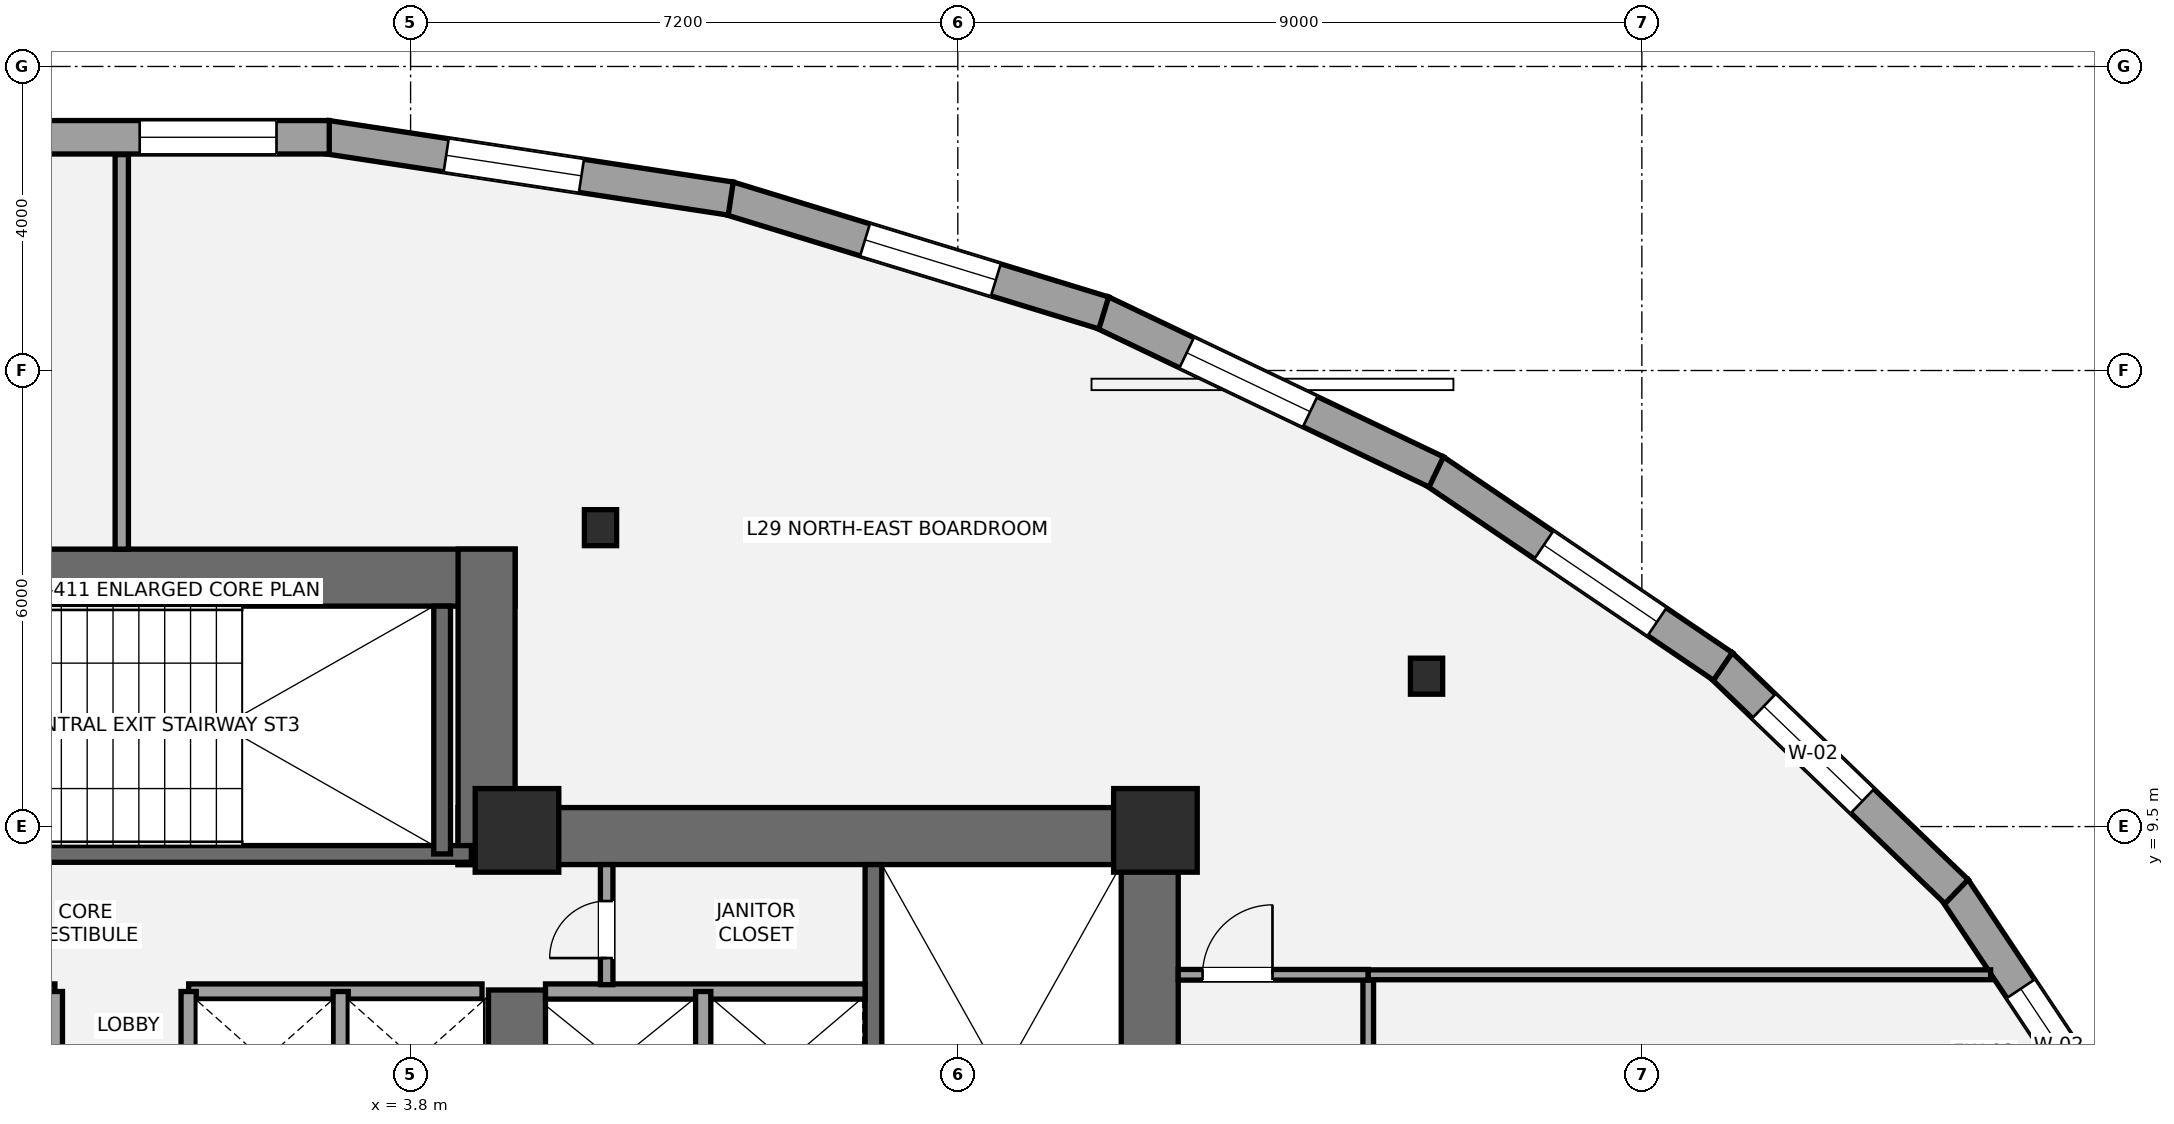
"""IFC4 building model, lengths in metres.
Left out: names, types, materials, properties, quantities, classifications, styles, units other than length and angle.
Written with IfcOpenShell. Run it as: python <this file> out.ifc"""

import sys

from ifc_helpers import new_model, si_unit, direction, frame, frame_2d, origin, origin_2d, place, context, subcontext, project, spatial, rectangle, i_section, extrude, element, fill, save


model = new_model("IFC4")
c1 = context("Model", 3, precision=1e-05, world=origin(), true_north=direction((0.0, 1.0)))
c2 = subcontext(c1, "Body", "Model", "MODEL_VIEW")
j1 = project(units=[si_unit("LENGTHUNIT", "METRE"), si_unit("PLANEANGLEUNIT", "RADIAN")], contexts=[c1])
p1 = place(None, origin())
s1 = spatial("IfcSite", under=j1, at=p1, CompositionType="ELEMENT")
p2 = place(p1, origin())
s2 = spatial("IfcBuilding", under=s1, at=p2, CompositionType="ELEMENT")
p3 = place(p2, frame((0.0, 0.0, 110.6)))
s3 = spatial("IfcBuildingStorey", under=s2, at=p3, CompositionType="ELEMENT", Elevation=110.6)
p4 = place(p3, frame((13.525, 1.1, 0.0), z_axis=(0.0, 0.0, 1.0), x_axis=(0.0, 1.0, 0.0)))
e1 = element("IfcWall", 1, at=p4, inside=s3, PredefinedType="SHEAR", context=c2, shape_type="SweptSolid", body=[
    extrude(rectangle(XDim=8.65, YDim=0.75, at=frame_2d((4.325, 0.0))), origin(), (0.0, 0.0, 1.0), 3.5),
])
p5 = place(p3, frame((4.425, 9.375, 0.0), z_axis=(0.0, 0.0, 1.0), x_axis=(1.0, 0.0, 0.0)))
e2 = element("IfcWall", 2, at=p5, inside=s3, PredefinedType="SHEAR", context=c2, shape_type="SweptSolid", body=[
    extrude(rectangle(XDim=9.475, YDim=0.75, at=frame_2d((4.737, 0.0))), origin(), (0.0, 0.0, 1.0), 3.5),
])
p6 = place(p3, frame((5.2, 5.35, 0.0), z_axis=(0.0, 0.0, 1.0), x_axis=(0.0, 1.0, 0.0)))
e3 = element("IfcWall", 3, at=p6, inside=s3, PredefinedType="SHEAR", context=c2, shape_type="SweptSolid", body=[
    extrude(rectangle(XDim=2.0, YDim=0.75, at=frame_2d((1.0, 0.0))), origin(), (0.0, 0.0, 1.0), 3.5),
])
p7 = place(p3, frame((9.89, 1.85, 0.0), z_axis=(0.0, 0.0, 1.0), x_axis=(0.0, 1.0, 0.0)))
e4 = element("IfcWall", 4, at=p7, inside=s3, PredefinedType="SHEAR", context=c2, shape_type="SweptSolid", body=[
    extrude(rectangle(XDim=7.15, YDim=0.22, at=frame_2d((3.575, 0.0))), origin(), (0.0, 0.0, 1.0), 3.5),
])
p8 = place(p3, frame((-5.175, 12.775, 0.0), z_axis=(0.0, 0.0, 1.0), x_axis=(1.0, 0.0, 0.0)))
e5 = element("IfcWall", 5, at=p8, inside=s3, PredefinedType="SHEAR", context=c2, shape_type="SweptSolid", body=[
    extrude(rectangle(XDim=10.35, YDim=0.75, at=frame_2d((5.175, 0.0))), origin(), (0.0, 0.0, 1.0), 3.5),
])
p9 = place(p3, frame((4.8, 9.0, 0.0), z_axis=(0.0, 0.0, 1.0), x_axis=(0.0, 1.0, 0.0)))
e6 = element("IfcWall", 6, at=p9, inside=s3, PredefinedType="SHEAR", context=c2, shape_type="SweptSolid", body=[
    extrude(rectangle(XDim=4.15, YDim=0.75, at=frame_2d((2.075, 0.0))), origin(), (0.0, 0.0, 1.0), 3.5),
])
p10 = place(p3, frame((-4.7, 9.14, 0.0), z_axis=(0.0, 0.0, 1.0), x_axis=(1.0, 0.0, 0.0)))
e7 = element("IfcWall", 7, at=p10, inside=s3, PredefinedType="SHEAR", context=c2, shape_type="SweptSolid", body=[
    extrude(rectangle(XDim=9.3, YDim=0.22, at=frame_2d((4.65, 0.0))), origin(), (0.0, 0.0, 1.0), 3.5),
])
p11 = place(p10, frame((1.15, 0.0, 0.0)))
e8 = element("IfcOpeningElement", 8, at=p11, cuts=e7, PredefinedType="OPENING", context=c2, shape_type="SweptSolid", body=[
    extrude(rectangle(XDim=1.05, YDim=2.15, at=frame_2d((0.525, 1.075))), frame((0.0, 0.12, 0.0), z_axis=(0.0, -1.0, 0.0), x_axis=(1.0, 0.0, 0.0)), (0.0, 0.0, 1.0), 0.24),
])
p12 = place(p3, frame((4.215, 9.14, 0.0), z_axis=(0.0, 0.0, 1.0), x_axis=(0.0, 1.0, 0.0)))
e9 = element("IfcWall", 9, at=p12, inside=s3, PredefinedType="SHEAR", context=c2, shape_type="SweptSolid", body=[
    extrude(rectangle(XDim=3.26, YDim=0.22, at=frame_2d((1.63, 0.0))), origin(), (0.0, 0.0, 1.0), 3.5),
])
for number, where, z_axis, x_axis in (
    (10, (5.2, 9.45, 0.0), (0.0, 0.0, 1.0), (1.0, 0.0, 0.0)),
    (11, (13.6, 9.45, 0.0), (0.0, 0.0, 1.0), (1.0, 0.0, 0.0)),
):
    element("IfcColumn", number, at=place(p3, frame(where, z_axis=z_axis, x_axis=x_axis)), inside=s3, PredefinedType="COLUMN", context=c2, shape_type="SweptSolid", body=[
        extrude(rectangle(XDim=1.1, YDim=1.1, at=origin_2d()), origin(), (0.0, 0.0, 1.0), 3.5),
    ])
for number, where, z_axis, x_axis in (
    (12, (17.167, 11.478, 0.0), (0.0, 0.0, 1.0), (1.0, 0.0, 0.0)),
    (13, (6.299, 13.433, 0.0), (0.0, 0.0, 1.0), (1.0, 0.0, 0.0)),
):
    element("IfcColumn", number, at=place(p3, frame(where, z_axis=z_axis, x_axis=x_axis)), inside=s3, PredefinedType="COLUMN", context=c2, shape_type="SweptSolid", body=[
        extrude(i_section(OverallWidth=0.424, OverallDepth=0.474, WebThickness=0.048, FlangeThickness=0.077, at=origin_2d()), origin(), (0.0, 0.0, 1.0), 3.5),
    ])
p13 = place(p3, frame((24.11, 8.68, 0.0), z_axis=(0.0, 0.0, 1.0), x_axis=(0.554293965046, -0.83232097193, 0.0)))
e14 = element("IfcWall", 14, at=p13, inside=s3, PredefinedType="STANDARD", context=c2, shape_type="SweptSolid", body=[
    extrude(rectangle(XDim=4.023, YDim=0.44, at=frame_2d((2.011, 0.0))), origin(), (0.0, 0.0, 1.0), 2.528),
])
p14 = place(p13, frame((1.579, 0.0, 0.65)))
e15 = element("IfcOpeningElement", 15, at=p14, cuts=e14, PredefinedType="OPENING", context=c2, shape_type="SweptSolid", body=[
    extrude(rectangle(XDim=1.8, YDim=1.7, at=frame_2d((0.9, 0.85))), frame((0.0, 0.23, 0.0), z_axis=(0.0, -1.0, 0.0), x_axis=(1.0, 0.0, 0.0)), (0.0, 0.0, 1.0), 0.46),
])
p15 = place(p3, frame((21.037, 11.63, 0.0), z_axis=(0.0, 0.0, 1.0), x_axis=(0.720581378362, -0.693370375166, 0.0)))
e16 = element("IfcWall", 16, at=p15, inside=s3, PredefinedType="STANDARD", context=c2, shape_type="SweptSolid", body=[
    extrude(rectangle(XDim=4.307, YDim=0.44, at=frame_2d((2.153, 0.0))), origin(), (0.0, 0.0, 1.0), 2.528),
])
p16 = place(p15, frame((0.788, 0.0, 0.65)))
e17 = element("IfcOpeningElement", 17, at=p16, cuts=e16, PredefinedType="OPENING", context=c2, shape_type="SweptSolid", body=[
    extrude(rectangle(XDim=1.8, YDim=1.7, at=frame_2d((0.9, 0.85))), frame((0.0, 0.23, 0.0), z_axis=(0.0, -1.0, 0.0), x_axis=(1.0, 0.0, 0.0)), (0.0, 0.0, 1.0), 0.46),
])
p17 = place(p3, frame((17.266, 14.182, 0.0), z_axis=(0.0, 0.0, 1.0), x_axis=(0.827754551165, -0.56109036975, 0.0)))
e18 = element("IfcWall", 18, at=p17, inside=s3, PredefinedType="STANDARD", context=c2, shape_type="SweptSolid", body=[
    extrude(rectangle(XDim=4.591, YDim=0.44, at=frame_2d((2.295, 0.0))), origin(), (0.0, 0.0, 1.0), 2.528),
])
p18 = place(p17, frame((1.744, 0.0, 0.65)))
e19 = element("IfcOpeningElement", 19, at=p18, cuts=e18, PredefinedType="OPENING", context=c2, shape_type="SweptSolid", body=[
    extrude(rectangle(XDim=1.8, YDim=1.7, at=frame_2d((0.9, 0.85))), frame((0.0, 0.23, 0.0), z_axis=(0.0, -1.0, 0.0), x_axis=(1.0, 0.0, 0.0)), (0.0, 0.0, 1.0), 0.46),
])
p19 = place(p3, frame((12.89, 16.27, 0.0), z_axis=(0.0, 0.0, 1.0), x_axis=(0.902372757907, -0.430956385018, 0.0)))
e20 = element("IfcWall", 20, at=p19, inside=s3, PredefinedType="STANDARD", context=c2, shape_type="SweptSolid", body=[
    extrude(rectangle(XDim=4.882, YDim=0.44, at=frame_2d((2.441, 0.0))), origin(), (0.0, 0.0, 1.0), 2.528),
])
p20 = place(p19, frame((1.243, 0.0, 0.65)))
e21 = element("IfcOpeningElement", 21, at=p20, cuts=e20, PredefinedType="OPENING", context=c2, shape_type="SweptSolid", body=[
    extrude(rectangle(XDim=1.8, YDim=1.7, at=frame_2d((0.9, 0.85))), frame((0.0, 0.23, 0.0), z_axis=(0.0, -1.0, 0.0), x_axis=(1.0, 0.0, 0.0)), (0.0, 0.0, 1.0), 0.46),
])
p21 = place(p3, frame((7.981, 17.769, 0.0), z_axis=(0.0, 0.0, 1.0), x_axis=(0.956228569431, -0.292620783617, 0.0)))
e22 = element("IfcWall", 22, at=p21, inside=s3, PredefinedType="STANDARD", context=c2, shape_type="SweptSolid", body=[
    extrude(rectangle(XDim=5.165, YDim=0.44, at=frame_2d((2.583, 0.0))), origin(), (0.0, 0.0, 1.0), 2.528),
])
p22 = place(p21, frame((1.88, 0.0, 0.65)))
e23 = element("IfcOpeningElement", 23, at=p22, cuts=e22, PredefinedType="OPENING", context=c2, shape_type="SweptSolid", body=[
    extrude(rectangle(XDim=1.8, YDim=1.7, at=frame_2d((0.9, 0.85))), frame((0.0, 0.23, 0.0), z_axis=(0.0, -1.0, 0.0), x_axis=(1.0, 0.0, 0.0)), (0.0, 0.0, 1.0), 0.46),
])
p23 = place(p3, frame((2.697, 18.571, 0.0), z_axis=(0.0, 0.0, 1.0), x_axis=(0.988627497469, -0.150385076545, 0.0)))
e24 = element("IfcWall", 24, at=p23, inside=s3, PredefinedType="STANDARD", context=c2, shape_type="SweptSolid", body=[
    extrude(rectangle(XDim=5.377, YDim=0.44, at=frame_2d((2.688, 0.0))), origin(), (0.0, 0.0, 1.0), 2.528),
])
p24 = place(p23, frame((1.59, 0.0, 0.65)))
e25 = element("IfcOpeningElement", 25, at=p24, cuts=e24, PredefinedType="OPENING", context=c2, shape_type="SweptSolid", body=[
    extrude(rectangle(XDim=1.8, YDim=1.7, at=frame_2d((0.9, 0.85))), frame((0.0, 0.23, 0.0), z_axis=(0.0, -1.0, 0.0), x_axis=(1.0, 0.0, 0.0)), (0.0, 0.0, 1.0), 0.46),
])
p25 = place(p3, frame((-2.73, 18.568, 0.0), z_axis=(0.0, 0.0, 1.0), x_axis=(1.0, 0.0, 0.0)))
e26 = element("IfcWall", 26, at=p25, inside=s3, PredefinedType="STANDARD", context=c2, shape_type="SweptSolid", body=[
    extrude(rectangle(XDim=5.459, YDim=0.44, at=frame_2d((2.73, 0.0))), origin(), (0.0, 0.0, 1.0), 2.528),
])
p26 = place(p25, frame((2.966, 0.0, 0.65)))
e27 = element("IfcOpeningElement", 27, at=p26, cuts=e26, PredefinedType="OPENING", context=c2, shape_type="SweptSolid", body=[
    extrude(rectangle(XDim=1.8, YDim=1.7, at=frame_2d((0.9, 0.85))), frame((0.0, 0.23, 0.0), z_axis=(0.0, -1.0, 0.0), x_axis=(1.0, 0.0, 0.0)), (0.0, 0.0, 1.0), 0.46),
])
p27 = place(p3, frame((5.575, 7.33, 0.0), z_axis=(0.0, 0.0, 1.0), x_axis=(1.0, 0.0, 0.0)))
e28 = element("IfcWall", 28, at=p27, inside=s3, PredefinedType="SOLIDWALL", context=c2, shape_type="SweptSolid", body=[
    extrude(rectangle(XDim=4.205, YDim=0.2, at=frame_2d((2.103, 0.0))), origin(), (0.0, 0.0, 1.0), 3.31),
])
p28 = place(p3, frame((7.65, 5.47, 0.0), z_axis=(0.0, 0.0, 1.0), x_axis=(0.0, 1.0, 0.0)))
e29 = element("IfcWall", 29, at=p28, inside=s3, PredefinedType="SOLIDWALL", context=c2, shape_type="SweptSolid", body=[
    extrude(rectangle(XDim=1.86, YDim=0.2, at=frame_2d((0.93, 0.0))), origin(), (0.0, 0.0, 1.0), 3.31),
])
for number, where, z_axis, x_axis in (
    (30, (-4.74, 7.33, 0.0), (0.0, 0.0, 1.0), (1.0, 0.0, 0.0)),
    (31, (0.88, 7.33, 0.0), (0.0, 0.0, 1.0), (1.0, 0.0, 0.0)),
):
    element("IfcWall", number, at=place(p3, frame(where, z_axis=z_axis, x_axis=x_axis)), inside=s3, PredefinedType="SOLIDWALL", context=c2, shape_type="SweptSolid", body=[
        extrude(rectangle(XDim=3.86, YDim=0.2, at=frame_2d((1.93, 0.0))), origin(), (0.0, 0.0, 1.0), 3.31),
    ])
for number, where, z_axis, x_axis in (
    (32, (2.88, 5.52, 0.0), (0.0, 0.0, 1.0), (0.0, 1.0, 0.0)),
    (33, (-0.88, 5.52, 0.0), (0.0, 0.0, 1.0), (0.0, 1.0, 0.0)),
    (34, (0.88, 5.52, 0.0), (0.0, 0.0, 1.0), (0.0, 1.0, 0.0)),
):
    element("IfcWall", number, at=place(p3, frame(where, z_axis=z_axis, x_axis=x_axis)), inside=s3, PredefinedType="SOLIDWALL", context=c2, shape_type="SweptSolid", body=[
        extrude(rectangle(XDim=1.81, YDim=0.2, at=frame_2d((0.905, 0.0))), origin(), (0.0, 0.0, 1.0), 3.31),
    ])
p29 = place(p3, frame((6.38, 7.42, 0.0), z_axis=(0.0, 0.0, 1.0), x_axis=(0.0, 1.0, 0.0)))
e35 = element("IfcWall", 35, at=p29, inside=s3, PredefinedType="PARTITIONING", context=c2, shape_type="SweptSolid", body=[
    extrude(rectangle(XDim=1.58, YDim=0.165, at=frame_2d((0.79, 0.0))), origin(), (0.0, 0.0, 1.0), 3.31),
])
p30 = place(p29, frame((0.35, 0.0, 0.0)))
e36 = element("IfcOpeningElement", 36, at=p30, cuts=e35, PredefinedType="OPENING", context=c2, shape_type="SweptSolid", body=[
    extrude(rectangle(XDim=0.75, YDim=2.1, at=frame_2d((0.375, 1.05))), frame((0.0, 0.093, 0.0), z_axis=(0.0, -1.0, 0.0), x_axis=(1.0, 0.0, 0.0)), (0.0, 0.0, 1.0), 0.185),
])
p31 = place(p3, frame((16.4, -14.341, 0.0), z_axis=(0.0, 0.0, 1.0), x_axis=(0.0, 1.0, 0.0)))
e37 = element("IfcWall", 37, at=p31, inside=s3, PredefinedType="PARTITIONING", context=c2, shape_type="SweptSolid", body=[
    extrude(rectangle(XDim=21.891, YDim=0.14, at=frame_2d((10.945, 0.0))), origin(), (0.0, 0.0, 1.0), 2.763),
])
p32 = place(p31, frame((11.44, 0.0, 0.0)))
e38 = element("IfcOpeningElement", 38, at=p32, cuts=e37, PredefinedType="OPENING", context=c2, shape_type="SweptSolid", body=[
    extrude(rectangle(XDim=0.9, YDim=2.1, at=frame_2d((0.45, 1.05))), frame((0.0, 0.08, 0.0), z_axis=(0.0, -1.0, 0.0), x_axis=(1.0, 0.0, 0.0)), (0.0, 0.0, 1.0), 0.16),
])
p33 = place(p31, frame((16.59, 0.0, 0.0)))
e39 = element("IfcOpeningElement", 39, at=p33, cuts=e37, PredefinedType="OPENING", context=c2, shape_type="SweptSolid", body=[
    extrude(rectangle(XDim=0.9, YDim=2.1, at=frame_2d((0.45, 1.05))), frame((0.0, 0.08, 0.0), z_axis=(0.0, -1.0, 0.0), x_axis=(1.0, 0.0, 0.0)), (0.0, 0.0, 1.0), 0.16),
])
p34 = place(p31, frame((19.965, 0.0, 0.0)))
e40 = element("IfcOpeningElement", 40, at=p34, cuts=e37, PredefinedType="OPENING", context=c2, shape_type="SweptSolid", body=[
    extrude(rectangle(XDim=0.9, YDim=2.1, at=frame_2d((0.45, 1.05))), frame((0.0, 0.08, 0.0), z_axis=(0.0, -1.0, 0.0), x_axis=(1.0, 0.0, 0.0)), (0.0, 0.0, 1.0), 0.16),
])
p35 = place(p3, frame((13.9, 7.55, 0.0), z_axis=(0.0, 0.0, 1.0), x_axis=(1.0, 0.0, 0.0)))
e41 = element("IfcWall", 41, at=p35, inside=s3, PredefinedType="PARTITIONING", context=c2, shape_type="SweptSolid", body=[
    extrude(rectangle(XDim=2.5, YDim=0.14, at=frame_2d((1.25, 0.0))), origin(), (0.0, 0.0, 1.0), 2.763),
])
p36 = place(p35, frame((0.32, 0.0, 0.0)))
e42 = element("IfcOpeningElement", 42, at=p36, cuts=e41, PredefinedType="OPENING", context=c2, shape_type="SweptSolid", body=[
    extrude(rectangle(XDim=0.92, YDim=2.15, at=frame_2d((0.46, 1.075))), frame((0.0, 0.08, 0.0), z_axis=(0.0, -1.0, 0.0), x_axis=(1.0, 0.0, 0.0)), (0.0, 0.0, 1.0), 0.16),
])
p37 = place(p3, frame((0.0, 13.15, 0.0), z_axis=(0.0, 0.0, 1.0), x_axis=(0.0, 1.0, 0.0)))
e43 = element("IfcWall", 43, at=p37, inside=s3, PredefinedType="PARTITIONING", context=c2, shape_type="SweptSolid", body=[
    extrude(rectangle(XDim=5.19, YDim=0.175, at=frame_2d((2.595, 0.0))), origin(), (0.0, 0.0, 1.0), 2.763),
])
p38 = place(p3, frame((16.4, 7.55, 0.0), z_axis=(0.0, 0.0, 1.0), x_axis=(1.0, 0.0, 0.0)))
e44 = element("IfcWall", 44, at=p38, inside=s3, PredefinedType="PARTITIONING", context=c2, shape_type="SweptSolid", body=[
    extrude(rectangle(XDim=8.189, YDim=0.13, at=frame_2d((4.094, 0.0))), origin(), (0.0, 0.0, 1.0), 2.763),
])
p39 = place(p14, origin())
e45 = element("IfcWindow", 45, at=p39, inside=s3, PartitioningType="SINGLE_PANEL", PredefinedType="WINDOW", context=c2, shape_type="SweptSolid", body=[
    extrude(rectangle(XDim=1.8, YDim=1.7, at=frame_2d((0.9, 0.85))), frame((0.0, -0.01, 0.0), z_axis=(0.0, -1.0, 0.0), x_axis=(1.0, 0.0, 0.0)), (0.0, 0.0, 1.0), 0.06),
])
fill(e15, e45)
p40 = place(p16, origin())
e46 = element("IfcWindow", 46, at=p40, inside=s3, PartitioningType="SINGLE_PANEL", PredefinedType="WINDOW", context=c2, shape_type="SweptSolid", body=[
    extrude(rectangle(XDim=1.8, YDim=1.7, at=frame_2d((0.9, 0.85))), frame((0.0, -0.01, 0.0), z_axis=(0.0, -1.0, 0.0), x_axis=(1.0, 0.0, 0.0)), (0.0, 0.0, 1.0), 0.06),
])
fill(e17, e46)
p41 = place(p18, origin())
e47 = element("IfcWindow", 47, at=p41, inside=s3, PartitioningType="SINGLE_PANEL", PredefinedType="WINDOW", context=c2, shape_type="SweptSolid", body=[
    extrude(rectangle(XDim=1.8, YDim=1.7, at=frame_2d((0.9, 0.85))), frame((0.0, -0.01, 0.0), z_axis=(0.0, -1.0, 0.0), x_axis=(1.0, 0.0, 0.0)), (0.0, 0.0, 1.0), 0.06),
])
fill(e19, e47)
p42 = place(p20, origin())
e48 = element("IfcWindow", 48, at=p42, inside=s3, PartitioningType="SINGLE_PANEL", PredefinedType="WINDOW", context=c2, shape_type="SweptSolid", body=[
    extrude(rectangle(XDim=1.8, YDim=1.7, at=frame_2d((0.9, 0.85))), frame((0.0, -0.01, 0.0), z_axis=(0.0, -1.0, 0.0), x_axis=(1.0, 0.0, 0.0)), (0.0, 0.0, 1.0), 0.06),
])
fill(e21, e48)
p43 = place(p22, origin())
e49 = element("IfcWindow", 49, at=p43, inside=s3, PartitioningType="SINGLE_PANEL", PredefinedType="WINDOW", context=c2, shape_type="SweptSolid", body=[
    extrude(rectangle(XDim=1.8, YDim=1.7, at=frame_2d((0.9, 0.85))), frame((0.0, -0.01, 0.0), z_axis=(0.0, -1.0, 0.0), x_axis=(1.0, 0.0, 0.0)), (0.0, 0.0, 1.0), 0.06),
])
fill(e23, e49)
p44 = place(p24, origin())
e50 = element("IfcWindow", 50, at=p44, inside=s3, PartitioningType="SINGLE_PANEL", PredefinedType="WINDOW", context=c2, shape_type="SweptSolid", body=[
    extrude(rectangle(XDim=1.8, YDim=1.7, at=frame_2d((0.9, 0.85))), frame((0.0, -0.01, 0.0), z_axis=(0.0, -1.0, 0.0), x_axis=(1.0, 0.0, 0.0)), (0.0, 0.0, 1.0), 0.06),
])
fill(e25, e50)
p45 = place(p26, origin())
e51 = element("IfcWindow", 51, at=p45, inside=s3, PartitioningType="SINGLE_PANEL", PredefinedType="WINDOW", context=c2, shape_type="SweptSolid", body=[
    extrude(rectangle(XDim=1.8, YDim=1.7, at=frame_2d((0.9, 0.85))), frame((0.0, -0.01, 0.0), z_axis=(0.0, -1.0, 0.0), x_axis=(1.0, 0.0, 0.0)), (0.0, 0.0, 1.0), 0.06),
])
fill(e27, e51)
p46 = place(p30, origin())
e52 = element("IfcDoor", 52, at=p46, inside=s3, OperationType="SINGLE_SWING_LEFT", PredefinedType="DOOR", context=c2, shape_type="SweptSolid", body=[
    extrude(rectangle(XDim=0.75, YDim=2.1, at=frame_2d((0.375, 1.05))), frame((0.0, 0.025, 0.0), z_axis=(0.0, -1.0, 0.0), x_axis=(1.0, 0.0, 0.0)), (0.0, 0.0, 1.0), 0.05),
])
fill(e36, e52)
p47 = place(p36, origin())
e53 = element("IfcDoor", 53, at=p47, inside=s3, OperationType="SINGLE_SWING_RIGHT", PredefinedType="DOOR", context=c2, shape_type="SweptSolid", body=[
    extrude(rectangle(XDim=0.92, YDim=2.15, at=frame_2d((0.46, 1.075))), frame((0.0, 0.025, 0.0), z_axis=(0.0, -1.0, 0.0), x_axis=(1.0, 0.0, 0.0)), (0.0, 0.0, 1.0), 0.05),
])
fill(e42, e53)
save(model, sys.argv[1])
